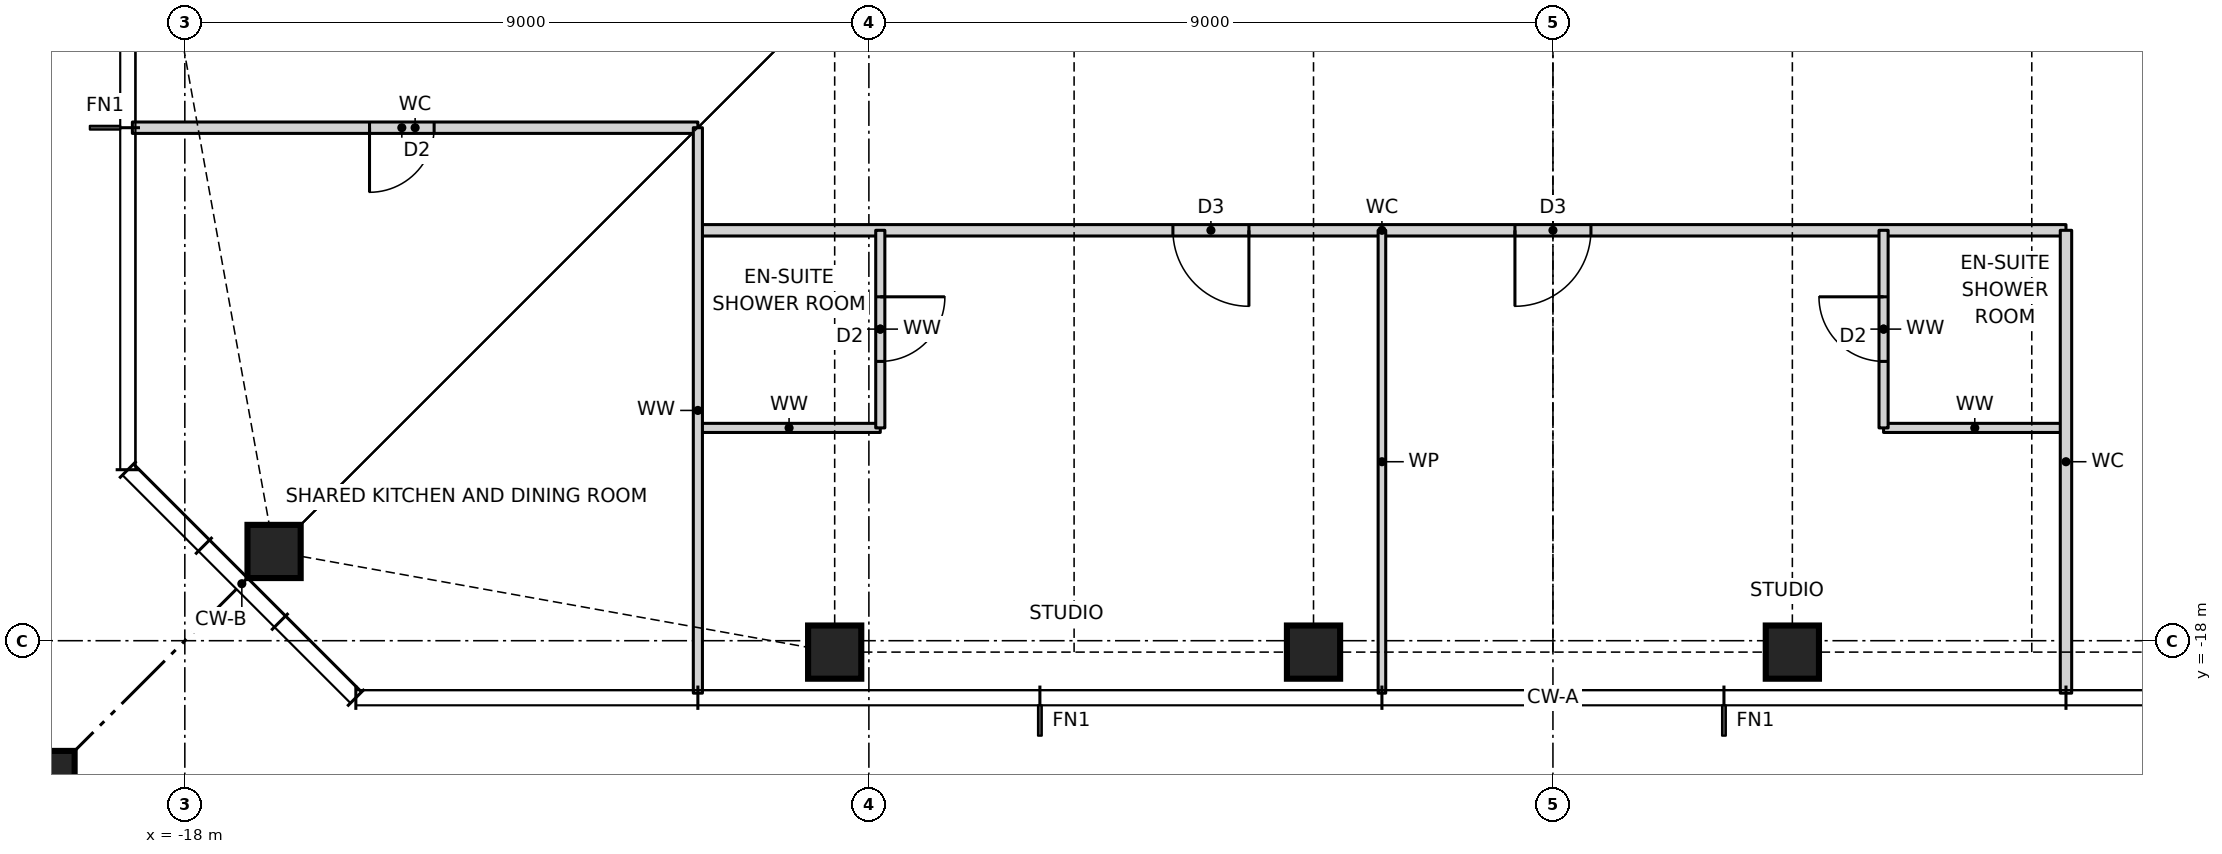
"""IFC4 building model, lengths in metres.
Left out: names, types, materials, properties, quantities, classifications, styles, units other than length and angle.
Written with IfcOpenShell. Run it as: python <this file> out.ifc"""

import sys

from ifc_helpers import new_model, si_unit, direction, frame, frame_2d, origin, origin_2d, place, context, subcontext, project, spatial, rectangle, hollow_rectangle, i_section, extrude, element, fill, save


model = new_model("IFC4")
c1 = context("Model", 3, precision=1e-05, world=origin(), true_north=direction((0.0, 1.0)))
c2 = subcontext(c1, "Body", "Model", "MODEL_VIEW")
j1 = project(units=[si_unit("LENGTHUNIT", "METRE"), si_unit("PLANEANGLEUNIT", "RADIAN")], contexts=[c1])
p1 = place(None, origin())
s1 = spatial("IfcSite", under=j1, at=p1, CompositionType="ELEMENT")
p2 = place(p1, origin())
s2 = spatial("IfcBuilding", under=s1, at=p2, CompositionType="ELEMENT")
p3 = place(p2, frame((0.0, 0.0, 198.5)))
s3 = spatial("IfcBuildingStorey", under=s2, at=p3, CompositionType="ELEMENT", Elevation=198.5)
for number, where, z_axis, x_axis in (
    (1, (-16.826, -16.826, 0.0), (0.0, 0.0, 1.0), (1.0, 0.0, 0.0)),
    (2, (-9.45, -18.15, 0.0), (0.0, 0.0, 1.0), (1.0, 0.0, 0.0)),
    (3, (-3.15, -18.15, 0.0), (0.0, 0.0, 1.0), (1.0, 0.0, 0.0)),
    (4, (3.15, -18.15, 0.0), (0.0, 0.0, 1.0), (1.0, 0.0, 0.0)),
):
    element("IfcColumn", number, at=place(p3, frame(where, z_axis=z_axis, x_axis=x_axis)), inside=s3, PredefinedType="COLUMN", context=c2, shape_type="SweptSolid", body=[
        extrude(hollow_rectangle(XDim=0.7, YDim=0.7, WallThickness=0.06, at=origin_2d()), origin(), (0.0, 0.0, 1.0), 3.5),
    ])
p4 = place(p3, frame((-21.65, -21.65, 0.0), z_axis=(0.0, 0.0, 1.0), x_axis=(1.0, 0.0, 0.0)))
e5 = element("IfcColumn", 5, at=p4, inside=s3, PredefinedType="COLUMN", context=c2, shape_type="SweptSolid", body=[
    extrude(rectangle(XDim=4.4, YDim=4.4, at=origin_2d()), origin(), (0.0, 0.0, 1.0), 3.5),
    extrude(i_section(OverallWidth=0.478, OverallDepth=0.599, WebThickness=0.1, FlangeThickness=0.14, at=origin_2d()), origin(), (0.0, 0.0, 1.0), 3.5),
])
for number, where, z_axis, x_axis in (
    (6, (-11.25, -15.2, 0.0), (0.0, 0.0, 1.0), (1.0, 0.0, 0.0)),
    (7, (4.35, -15.2, 0.0), (0.0, 0.0, 1.0), (1.0, 0.0, 0.0)),
):
    element("IfcWall", number, at=place(p3, frame(where, z_axis=z_axis, x_axis=x_axis)), inside=s3, PredefinedType="PARTITIONING", context=c2, shape_type="SweptSolid", body=[
        extrude(rectangle(XDim=2.4, YDim=0.12, at=frame_2d((1.2, 0.0))), origin(), (0.0, 0.0, 1.0), 3.27),
    ])
p5 = place(p3, frame((-11.25, -12.6, 0.0), z_axis=(0.0, 0.0, 1.0), x_axis=(1.0, 0.0, 0.0)))
e8 = element("IfcWall", 8, at=p5, inside=s3, PredefinedType="PARTITIONING", context=c2, shape_type="SweptSolid", body=[
    extrude(rectangle(XDim=18.0, YDim=0.15, at=frame_2d((9.0, 0.0))), origin(), (0.0, 0.0, 1.0), 3.27),
])
p6 = place(p5, frame((6.25, 0.0, 0.0)))
e9 = element("IfcOpeningElement", 9, at=p6, cuts=e8, PredefinedType="OPENING", context=c2, shape_type="SweptSolid", body=[
    extrude(rectangle(XDim=1.0, YDim=2.1, at=frame_2d((0.5, 1.05))), frame((0.0, 0.085, 0.0), z_axis=(0.0, -1.0, 0.0), x_axis=(1.0, 0.0, 0.0)), (0.0, 0.0, 1.0), 0.17),
])
p7 = place(p5, frame((10.75, 0.0, 0.0)))
e10 = element("IfcOpeningElement", 10, at=p7, cuts=e8, PredefinedType="OPENING", context=c2, shape_type="SweptSolid", body=[
    extrude(rectangle(XDim=1.0, YDim=2.1, at=frame_2d((0.5, 1.05))), frame((0.0, 0.085, 0.0), z_axis=(0.0, -1.0, 0.0), x_axis=(1.0, 0.0, 0.0)), (0.0, 0.0, 1.0), 0.17),
])
p8 = place(p3, frame((-18.69, -11.25, 0.0), z_axis=(0.0, 0.0, 1.0), x_axis=(1.0, 0.0, 0.0)))
e11 = element("IfcWall", 11, at=p8, inside=s3, PredefinedType="PARTITIONING", context=c2, shape_type="SweptSolid", body=[
    extrude(rectangle(XDim=7.44, YDim=0.15, at=frame_2d((3.72, 0.0))), origin(), (0.0, 0.0, 1.0), 3.27),
])
p9 = place(p8, frame((3.12, 0.0, 0.0)))
e12 = element("IfcOpeningElement", 12, at=p9, cuts=e11, PredefinedType="OPENING", context=c2, shape_type="SweptSolid", body=[
    extrude(rectangle(XDim=0.85, YDim=2.1, at=frame_2d((0.425, 1.05))), frame((0.0, 0.085, 0.0), z_axis=(0.0, -1.0, 0.0), x_axis=(1.0, 0.0, 0.0)), (0.0, 0.0, 1.0), 0.17),
])
p10 = place(p3, frame((6.75, -18.69, 0.0), z_axis=(0.0, 0.0, 1.0), x_axis=(0.0, 1.0, 0.0)))
e13 = element("IfcWall", 13, at=p10, inside=s3, PredefinedType="PARTITIONING", context=c2, shape_type="SweptSolid", body=[
    extrude(rectangle(XDim=6.09, YDim=0.15, at=frame_2d((3.045, 0.0))), origin(), (0.0, 0.0, 1.0), 3.27),
])
p11 = place(p3, frame((4.35, -15.2, 0.0), z_axis=(0.0, 0.0, 1.0), x_axis=(0.0, 1.0, 0.0)))
e14 = element("IfcWall", 14, at=p11, inside=s3, PredefinedType="PARTITIONING", context=c2, shape_type="SweptSolid", body=[
    extrude(rectangle(XDim=2.6, YDim=0.12, at=frame_2d((1.3, 0.0))), origin(), (0.0, 0.0, 1.0), 3.27),
])
p12 = place(p11, frame((0.875, 0.0, 0.0)))
e15 = element("IfcOpeningElement", 15, at=p12, cuts=e14, PredefinedType="OPENING", context=c2, shape_type="SweptSolid", body=[
    extrude(rectangle(XDim=0.85, YDim=2.1, at=frame_2d((0.425, 1.05))), frame((0.0, 0.07, 0.0), z_axis=(0.0, -1.0, 0.0), x_axis=(1.0, 0.0, 0.0)), (0.0, 0.0, 1.0), 0.14),
])
p13 = place(p3, frame((-2.25, -18.69, 0.0), z_axis=(0.0, 0.0, 1.0), x_axis=(0.0, 1.0, 0.0)))
e16 = element("IfcWall", 16, at=p13, inside=s3, PredefinedType="PARTITIONING", context=c2, shape_type="SweptSolid", body=[
    extrude(rectangle(XDim=6.09, YDim=0.1, at=frame_2d((3.045, 0.0))), origin(), (0.0, 0.0, 1.0), 3.27),
])
p14 = place(p3, frame((-8.85, -15.2, 0.0), z_axis=(0.0, 0.0, 1.0), x_axis=(0.0, 1.0, 0.0)))
e17 = element("IfcWall", 17, at=p14, inside=s3, PredefinedType="PARTITIONING", context=c2, shape_type="SweptSolid", body=[
    extrude(rectangle(XDim=2.6, YDim=0.12, at=frame_2d((1.3, 0.0))), origin(), (0.0, 0.0, 1.0), 3.27),
])
p15 = place(p14, frame((0.875, 0.0, 0.0)))
e18 = element("IfcOpeningElement", 18, at=p15, cuts=e17, PredefinedType="OPENING", context=c2, shape_type="SweptSolid", body=[
    extrude(rectangle(XDim=0.85, YDim=2.1, at=frame_2d((0.425, 1.05))), frame((0.0, 0.07, 0.0), z_axis=(0.0, -1.0, 0.0), x_axis=(1.0, 0.0, 0.0)), (0.0, 0.0, 1.0), 0.14),
])
p16 = place(p3, frame((-11.25, -18.69, 0.0), z_axis=(0.0, 0.0, 1.0), x_axis=(0.0, 1.0, 0.0)))
e19 = element("IfcWall", 19, at=p16, inside=s3, PredefinedType="PARTITIONING", context=c2, shape_type="SweptSolid", body=[
    extrude(rectangle(XDim=7.44, YDim=0.12, at=frame_2d((3.72, 0.0))), origin(), (0.0, 0.0, 1.0), 3.27),
])
p17 = place(p6, frame((1.0, 0.0, 0.0), z_axis=(0.0, 0.0, 1.0), x_axis=(-1.0, 0.0, 0.0)))
e20 = element("IfcDoor", 20, at=p17, inside=s3, OperationType="SINGLE_SWING_LEFT", PredefinedType="DOOR", context=c2, shape_type="SweptSolid", body=[
    extrude(rectangle(XDim=1.0, YDim=2.1, at=frame_2d((0.5, 1.05))), frame((0.0, 0.025, 0.0), z_axis=(0.0, -1.0, 0.0), x_axis=(1.0, 0.0, 0.0)), (0.0, 0.0, 1.0), 0.05),
])
fill(e9, e20)
p18 = place(p15, frame((0.85, 0.0, 0.0), z_axis=(0.0, 0.0, 1.0), x_axis=(-1.0, 0.0, 0.0)))
e21 = element("IfcDoor", 21, at=p18, inside=s3, OperationType="SINGLE_SWING_LEFT", PredefinedType="DOOR", context=c2, shape_type="SweptSolid", body=[
    extrude(rectangle(XDim=0.85, YDim=2.1, at=frame_2d((0.425, 1.05))), frame((0.0, 0.025, 0.0), z_axis=(0.0, -1.0, 0.0), x_axis=(1.0, 0.0, 0.0)), (0.0, 0.0, 1.0), 0.05),
])
fill(e18, e21)
p19 = place(p7, frame((1.0, 0.0, 0.0), z_axis=(0.0, 0.0, 1.0), x_axis=(-1.0, 0.0, 0.0)))
e22 = element("IfcDoor", 22, at=p19, inside=s3, OperationType="SINGLE_SWING_RIGHT", PredefinedType="DOOR", context=c2, shape_type="SweptSolid", body=[
    extrude(rectangle(XDim=1.0, YDim=2.1, at=frame_2d((0.5, 1.05))), frame((0.0, 0.025, 0.0), z_axis=(0.0, -1.0, 0.0), x_axis=(1.0, 0.0, 0.0)), (0.0, 0.0, 1.0), 0.05),
])
fill(e10, e22)
p20 = place(p12, origin())
e23 = element("IfcDoor", 23, at=p20, inside=s3, OperationType="SINGLE_SWING_RIGHT", PredefinedType="DOOR", context=c2, shape_type="SweptSolid", body=[
    extrude(rectangle(XDim=0.85, YDim=2.1, at=frame_2d((0.425, 1.05))), frame((0.0, 0.025, 0.0), z_axis=(0.0, -1.0, 0.0), x_axis=(1.0, 0.0, 0.0)), (0.0, 0.0, 1.0), 0.05),
])
fill(e15, e23)
p21 = place(p9, frame((0.85, 0.0, 0.0), z_axis=(0.0, 0.0, 1.0), x_axis=(-1.0, 0.0, 0.0)))
e24 = element("IfcDoor", 24, at=p21, inside=s3, OperationType="SINGLE_SWING_RIGHT", PredefinedType="DOOR", context=c2, shape_type="SweptSolid", body=[
    extrude(rectangle(XDim=0.85, YDim=2.1, at=frame_2d((0.425, 1.05))), frame((0.0, 0.025, 0.0), z_axis=(0.0, -1.0, 0.0), x_axis=(1.0, 0.0, 0.0)), (0.0, 0.0, 1.0), 0.05),
])
fill(e12, e24)
save(model, sys.argv[1])
